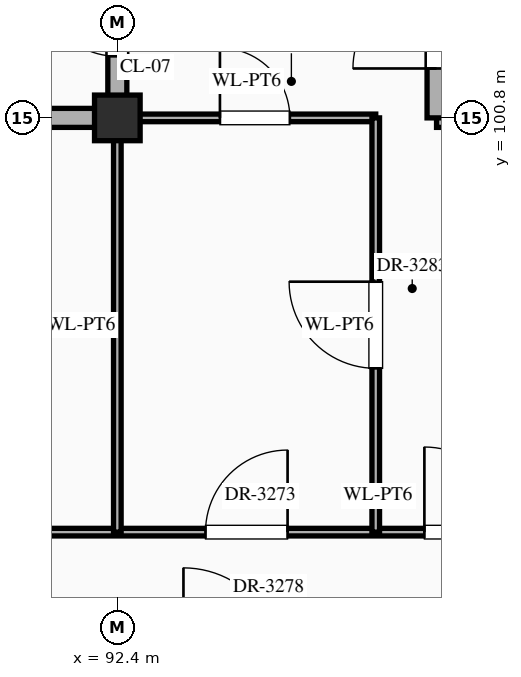
"""IFC4 building model, lengths in metres.
Left out: names, types, materials, properties, quantities, classifications, styles, units other than length and angle.
Written with IfcOpenShell. Run it as: python <this file> out.ifc"""

import sys

from ifc_helpers import new_model, si_unit, direction, frame, frame_2d, origin, origin_2d, place, context, subcontext, project, spatial, rectangle, extrude, element, fill, save


model = new_model("IFC4")
c1 = context("Model", 3, precision=1e-05, world=origin(), true_north=direction((0.0, 1.0)))
c2 = subcontext(c1, "Body", "Model", "MODEL_VIEW")
j1 = project(units=[si_unit("LENGTHUNIT", "METRE"), si_unit("PLANEANGLEUNIT", "RADIAN")], contexts=[c1])
p1 = place(None, origin())
s1 = spatial("IfcSite", under=j1, at=p1, CompositionType="ELEMENT")
p2 = place(p1, origin())
s2 = spatial("IfcBuilding", under=s1, at=p2, CompositionType="ELEMENT")
p3 = place(p2, frame((0.0, 0.0, 60.3)))
s3 = spatial("IfcBuildingStorey", under=s2, at=p3, CompositionType="ELEMENT", Elevation=60.3)
p4 = place(p3, frame((92.4, 100.8, 0.0), z_axis=(0.0, 0.0, 1.0), x_axis=(1.0, 0.0, 0.0)))
e1 = element("IfcColumn", 1, at=p4, inside=s3, PredefinedType="COLUMN", context=c2, shape_type="SweptSolid", body=[
    extrude(rectangle(XDim=0.6, YDim=0.6, at=origin_2d()), origin(), (0.0, 0.0, 1.0), 4.2),
])
p5 = place(p3, frame((58.84, 95.35, 0.0), z_axis=(0.0, 0.0, 1.0), x_axis=(1.0, 0.0, 0.0)))
e2 = element("IfcWall", 2, at=p5, inside=s3, PredefinedType="STANDARD", context=c2, shape_type="SweptSolid", body=[
    extrude(rectangle(XDim=50.32, YDim=0.1, at=frame_2d((25.16, 0.0))), origin(), (0.0, 0.0, 1.0), 3.96),
])
p6 = place(p5, frame((3.67, 0.0, 0.0)))
e3 = element("IfcOpeningElement", 3, at=p6, cuts=e2, PredefinedType="OPENING", context=c2, shape_type="SweptSolid", body=[
    extrude(rectangle(XDim=1.02, YDim=2.4, at=frame_2d((0.51, 1.2))), frame((0.0, 0.062, 0.0), z_axis=(0.0, -1.0, 0.0), x_axis=(1.0, 0.0, 0.0)), (0.0, 0.0, 1.0), 0.124),
])
p7 = place(p5, frame((9.53, 0.0, 0.0)))
e4 = element("IfcOpeningElement", 4, at=p7, cuts=e2, PredefinedType="OPENING", context=c2, shape_type="SweptSolid", body=[
    extrude(rectangle(XDim=1.06, YDim=2.4, at=frame_2d((0.53, 1.2))), frame((0.0, 0.062, 0.0), z_axis=(0.0, -1.0, 0.0), x_axis=(1.0, 0.0, 0.0)), (0.0, 0.0, 1.0), 0.124),
])
p8 = place(p5, frame((12.39, 0.0, 0.0)))
e5 = element("IfcOpeningElement", 5, at=p8, cuts=e2, PredefinedType="OPENING", context=c2, shape_type="SweptSolid", body=[
    extrude(rectangle(XDim=1.14, YDim=2.4, at=frame_2d((0.57, 1.2))), frame((0.0, 0.062, 0.0), z_axis=(0.0, -1.0, 0.0), x_axis=(1.0, 0.0, 0.0)), (0.0, 0.0, 1.0), 0.124),
])
p9 = place(p5, frame((15.01, 0.0, 0.0)))
e6 = element("IfcOpeningElement", 6, at=p9, cuts=e2, PredefinedType="OPENING", context=c2, shape_type="SweptSolid", body=[
    extrude(rectangle(XDim=0.9, YDim=2.15, at=frame_2d((0.45, 1.075))), frame((0.0, 0.062, 0.0), z_axis=(0.0, -1.0, 0.0), x_axis=(1.0, 0.0, 0.0)), (0.0, 0.0, 1.0), 0.124),
])
p10 = place(p5, frame((20.53, 0.0, 0.0)))
e7 = element("IfcOpeningElement", 7, at=p10, cuts=e2, PredefinedType="OPENING", context=c2, shape_type="SweptSolid", body=[
    extrude(rectangle(XDim=0.86, YDim=2.1, at=frame_2d((0.43, 1.05))), frame((0.0, 0.062, 0.0), z_axis=(0.0, -1.0, 0.0), x_axis=(1.0, 0.0, 0.0)), (0.0, 0.0, 1.0), 0.124),
])
p11 = place(p5, frame((28.84, 0.0, 0.0)))
e8 = element("IfcOpeningElement", 8, at=p11, cuts=e2, PredefinedType="OPENING", context=c2, shape_type="SweptSolid", body=[
    extrude(rectangle(XDim=1.04, YDim=2.2, at=frame_2d((0.52, 1.1))), frame((0.0, 0.062, 0.0), z_axis=(0.0, -1.0, 0.0), x_axis=(1.0, 0.0, 0.0)), (0.0, 0.0, 1.0), 0.124),
])
p12 = place(p5, frame((34.72, 0.0, 0.0)))
e9 = element("IfcOpeningElement", 9, at=p12, cuts=e2, PredefinedType="OPENING", context=c2, shape_type="SweptSolid", body=[
    extrude(rectangle(XDim=1.08, YDim=2.25, at=frame_2d((0.54, 1.125))), frame((0.0, 0.062, 0.0), z_axis=(0.0, -1.0, 0.0), x_axis=(1.0, 0.0, 0.0)), (0.0, 0.0, 1.0), 0.124),
])
p13 = place(p5, frame((37.6, 0.0, 0.0)))
e10 = element("IfcOpeningElement", 10, at=p13, cuts=e2, PredefinedType="OPENING", context=c2, shape_type="SweptSolid", body=[
    extrude(rectangle(XDim=1.12, YDim=2.25, at=frame_2d((0.56, 1.125))), frame((0.0, 0.062, 0.0), z_axis=(0.0, -1.0, 0.0), x_axis=(1.0, 0.0, 0.0)), (0.0, 0.0, 1.0), 0.124),
])
p14 = place(p5, frame((40.08, 0.0, 0.0)))
e11 = element("IfcOpeningElement", 11, at=p14, cuts=e2, PredefinedType="OPENING", context=c2, shape_type="SweptSolid", body=[
    extrude(rectangle(XDim=1.16, YDim=2.3, at=frame_2d((0.58, 1.15))), frame((0.0, 0.062, 0.0), z_axis=(0.0, -1.0, 0.0), x_axis=(1.0, 0.0, 0.0)), (0.0, 0.0, 1.0), 0.124),
])
p15 = place(p5, frame((45.54, 0.0, 0.0)))
e12 = element("IfcOpeningElement", 12, at=p15, cuts=e2, PredefinedType="OPENING", context=c2, shape_type="SweptSolid", body=[
    extrude(rectangle(XDim=1.2, YDim=2.35, at=frame_2d((0.6, 1.175))), frame((0.0, 0.062, 0.0), z_axis=(0.0, -1.0, 0.0), x_axis=(1.0, 0.0, 0.0)), (0.0, 0.0, 1.0), 0.124),
])
p16 = place(p3, frame((75.6, 100.8, 0.0), z_axis=(0.0, 0.0, 1.0), x_axis=(1.0, 0.0, 0.0)))
e13 = element("IfcWall", 13, at=p16, inside=s3, PredefinedType="STANDARD", context=c2, shape_type="SweptSolid", body=[
    extrude(rectangle(XDim=16.8, YDim=0.25, at=frame_2d((8.4, 0.0))), origin(), (0.0, 0.0, 1.0), 3.11),
])
p17 = place(p16, frame((3.725, 0.0, 0.0)))
e14 = element("IfcOpeningElement", 14, at=p17, cuts=e13, PredefinedType="OPENING", context=c2, shape_type="SweptSolid", body=[
    extrude(rectangle(XDim=0.95, YDim=2.15, at=frame_2d((0.475, 1.075))), frame((0.0, 0.137, 0.0), z_axis=(0.0, -1.0, 0.0), x_axis=(1.0, 0.0, 0.0)), (0.0, 0.0, 1.0), 0.274),
])
p18 = place(p16, frame((12.05, 0.0, 0.0)))
e15 = element("IfcOpeningElement", 15, at=p18, cuts=e13, PredefinedType="OPENING", context=c2, shape_type="SweptSolid", body=[
    extrude(rectangle(XDim=1.1, YDim=2.2, at=frame_2d((0.55, 1.1))), frame((0.0, 0.137, 0.0), z_axis=(0.0, -1.0, 0.0), x_axis=(1.0, 0.0, 0.0)), (0.0, 0.0, 1.0), 0.274),
])
p19 = place(p3, frame((92.4, 100.8, 0.0), z_axis=(0.0, 0.0, 1.0), x_axis=(1.0, 0.0, 0.0)))
e16 = element("IfcWall", 16, at=p19, inside=s3, PredefinedType="STANDARD", context=c2, shape_type="SweptSolid", body=[
    extrude(rectangle(XDim=3.4, YDim=0.1, at=frame_2d((1.7, 0.0))), origin(), (0.0, 0.0, 1.0), 3.11),
])
p20 = place(p19, frame((1.35, 0.0, 0.0)))
e17 = element("IfcOpeningElement", 17, at=p20, cuts=e16, PredefinedType="OPENING", context=c2, shape_type="SweptSolid", body=[
    extrude(rectangle(XDim=0.92, YDim=2.15, at=frame_2d((0.46, 1.075))), frame((0.0, 0.062, 0.0), z_axis=(0.0, -1.0, 0.0), x_axis=(1.0, 0.0, 0.0)), (0.0, 0.0, 1.0), 0.124),
])
p21 = place(p3, frame((96.6, 100.8, 0.0), z_axis=(0.0, 0.0, 1.0), x_axis=(1.0, 0.0, 0.0)))
e18 = element("IfcWall", 18, at=p21, inside=s3, PredefinedType="STANDARD", context=c2, shape_type="SweptSolid", body=[
    extrude(rectangle(XDim=12.56, YDim=0.25, at=frame_2d((6.28, 0.0))), origin(), (0.0, 0.0, 1.0), 3.11),
])
p22 = place(p21, frame((7.9, 0.0, 0.0)))
e19 = element("IfcOpeningElement", 19, at=p22, cuts=e18, PredefinedType="OPENING", context=c2, shape_type="SweptSolid", body=[
    extrude(rectangle(XDim=1.0, YDim=2.2, at=frame_2d((0.5, 1.1))), frame((0.0, 0.137, 0.0), z_axis=(0.0, -1.0, 0.0), x_axis=(1.0, 0.0, 0.0)), (0.0, 0.0, 1.0), 0.274),
])
p23 = place(p21, frame((0.25, 0.0, 0.0)))
e20 = element("IfcOpeningElement", 20, at=p23, cuts=e18, PredefinedType="OPENING", context=c2, shape_type="SweptSolid", body=[
    extrude(rectangle(XDim=1.1, YDim=2.2, at=frame_2d((0.55, 1.1))), frame((0.0, 0.137, 0.0), z_axis=(0.0, -1.0, 0.0), x_axis=(1.0, 0.0, 0.0)), (0.0, 0.0, 1.0), 0.274),
])
p24 = place(p3, frame((92.4, 95.35, 0.0), z_axis=(0.0, 0.0, 1.0), x_axis=(0.0, 1.0, 0.0)))
e21 = element("IfcWall", 21, at=p24, inside=s3, PredefinedType="STANDARD", context=c2, shape_type="SweptSolid", body=[
    extrude(rectangle(XDim=5.45, YDim=0.1, at=frame_2d((2.725, 0.0))), origin(), (0.0, 0.0, 1.0), 3.21),
])
p25 = place(p3, frame((92.4, 100.8, 0.0), z_axis=(0.0, 0.0, 1.0), x_axis=(0.0, 1.0, 0.0)))
e22 = element("IfcWall", 22, at=p25, inside=s3, PredefinedType="STANDARD", context=c2, shape_type="SweptSolid", body=[
    extrude(rectangle(XDim=3.6, YDim=0.25, at=frame_2d((1.8, 0.0))), origin(), (0.0, 0.0, 1.0), 3.21),
])
p26 = place(p25, frame((0.81, 0.0, 0.0)))
e23 = element("IfcOpeningElement", 23, at=p26, cuts=e22, PredefinedType="OPENING", context=c2, shape_type="SweptSolid", body=[
    extrude(rectangle(XDim=1.0, YDim=2.2, at=frame_2d((0.5, 1.1))), frame((0.0, 0.137, 0.0), z_axis=(0.0, -1.0, 0.0), x_axis=(1.0, 0.0, 0.0)), (0.0, 0.0, 1.0), 0.274),
])
p27 = place(p3, frame((95.8, 95.35, 0.0), z_axis=(0.0, 0.0, 1.0), x_axis=(0.0, 1.0, 0.0)))
e24 = element("IfcWall", 24, at=p27, inside=s3, PredefinedType="STANDARD", context=c2, shape_type="SweptSolid", body=[
    extrude(rectangle(XDim=5.45, YDim=0.1, at=frame_2d((2.725, 0.0))), origin(), (0.0, 0.0, 1.0), 3.96),
])
p28 = place(p27, frame((2.155, 0.0, 0.0)))
e25 = element("IfcOpeningElement", 25, at=p28, cuts=e24, PredefinedType="OPENING", context=c2, shape_type="SweptSolid", body=[
    extrude(rectangle(XDim=1.14, YDim=2.4, at=frame_2d((0.57, 1.2))), frame((0.0, 0.062, 0.0), z_axis=(0.0, -1.0, 0.0), x_axis=(1.0, 0.0, 0.0)), (0.0, 0.0, 1.0), 0.124),
])
p29 = place(p3, frame((96.6, 100.8, 0.0), z_axis=(0.0, 0.0, 1.0), x_axis=(0.0, 1.0, 0.0)))
e26 = element("IfcWall", 26, at=p29, inside=s3, PredefinedType="STANDARD", context=c2, shape_type="SweptSolid", body=[
    extrude(rectangle(XDim=3.6, YDim=0.25, at=frame_2d((1.8, 0.0))), origin(), (0.0, 0.0, 1.0), 3.96),
])
p30 = place(p29, frame((0.65, 0.0, 0.0)))
e27 = element("IfcOpeningElement", 27, at=p30, cuts=e26, PredefinedType="OPENING", context=c2, shape_type="SweptSolid", body=[
    extrude(rectangle(XDim=1.1, YDim=2.2, at=frame_2d((0.55, 1.1))), frame((0.0, 0.137, 0.0), z_axis=(0.0, -1.0, 0.0), x_axis=(1.0, 0.0, 0.0)), (0.0, 0.0, 1.0), 0.274),
])
p31 = place(p30, origin())
e28 = element("IfcDoor", 28, at=p31, inside=s3, OperationType="SINGLE_SWING_LEFT", PredefinedType="DOOR", context=c2, shape_type="SweptSolid", body=[
    extrude(rectangle(XDim=1.1, YDim=2.2, at=frame_2d((0.55, 1.1))), frame((0.0, 0.025, 0.0), z_axis=(0.0, -1.0, 0.0), x_axis=(1.0, 0.0, 0.0)), (0.0, 0.0, 1.0), 0.05),
])
fill(e27, e28)
p32 = place(p26, origin())
e29 = element("IfcDoor", 29, at=p32, inside=s3, OperationType="SINGLE_SWING_RIGHT", PredefinedType="DOOR", context=c2, shape_type="SweptSolid", body=[
    extrude(rectangle(XDim=1.0, YDim=2.2, at=frame_2d((0.5, 1.1))), frame((0.0, 0.025, 0.0), z_axis=(0.0, -1.0, 0.0), x_axis=(1.0, 0.0, 0.0)), (0.0, 0.0, 1.0), 0.05),
])
fill(e23, e29)
p33 = place(p20, origin())
e30 = element("IfcDoor", 30, at=p33, inside=s3, OperationType="SINGLE_SWING_LEFT", PredefinedType="DOOR", context=c2, shape_type="SweptSolid", body=[
    extrude(rectangle(XDim=0.92, YDim=2.15, at=frame_2d((0.46, 1.075))), frame((0.0, 0.025, 0.0), z_axis=(0.0, -1.0, 0.0), x_axis=(1.0, 0.0, 0.0)), (0.0, 0.0, 1.0), 0.05),
])
fill(e17, e30)
p34 = place(p12, origin())
e31 = element("IfcDoor", 31, at=p34, inside=s3, OperationType="SINGLE_SWING_RIGHT", PredefinedType="DOOR", context=c2, shape_type="SweptSolid", body=[
    extrude(rectangle(XDim=1.08, YDim=2.25, at=frame_2d((0.54, 1.125))), frame((0.0, 0.025, 0.0), z_axis=(0.0, -1.0, 0.0), x_axis=(1.0, 0.0, 0.0)), (0.0, 0.0, 1.0), 0.05),
])
fill(e9, e31)
p35 = place(p13, origin())
e32 = element("IfcDoor", 32, at=p35, inside=s3, OperationType="SINGLE_SWING_LEFT", PredefinedType="DOOR", context=c2, shape_type="SweptSolid", body=[
    extrude(rectangle(XDim=1.12, YDim=2.25, at=frame_2d((0.56, 1.125))), frame((0.0, 0.025, 0.0), z_axis=(0.0, -1.0, 0.0), x_axis=(1.0, 0.0, 0.0)), (0.0, 0.0, 1.0), 0.05),
])
fill(e10, e32)
p36 = place(p28, origin())
e33 = element("IfcDoor", 33, at=p36, inside=s3, OperationType="SINGLE_SWING_RIGHT", PredefinedType="DOOR", context=c2, shape_type="SweptSolid", body=[
    extrude(rectangle(XDim=1.14, YDim=2.4, at=frame_2d((0.57, 1.2))), frame((0.0, 0.025, 0.0), z_axis=(0.0, -1.0, 0.0), x_axis=(1.0, 0.0, 0.0)), (0.0, 0.0, 1.0), 0.05),
])
fill(e25, e33)
save(model, sys.argv[1])
